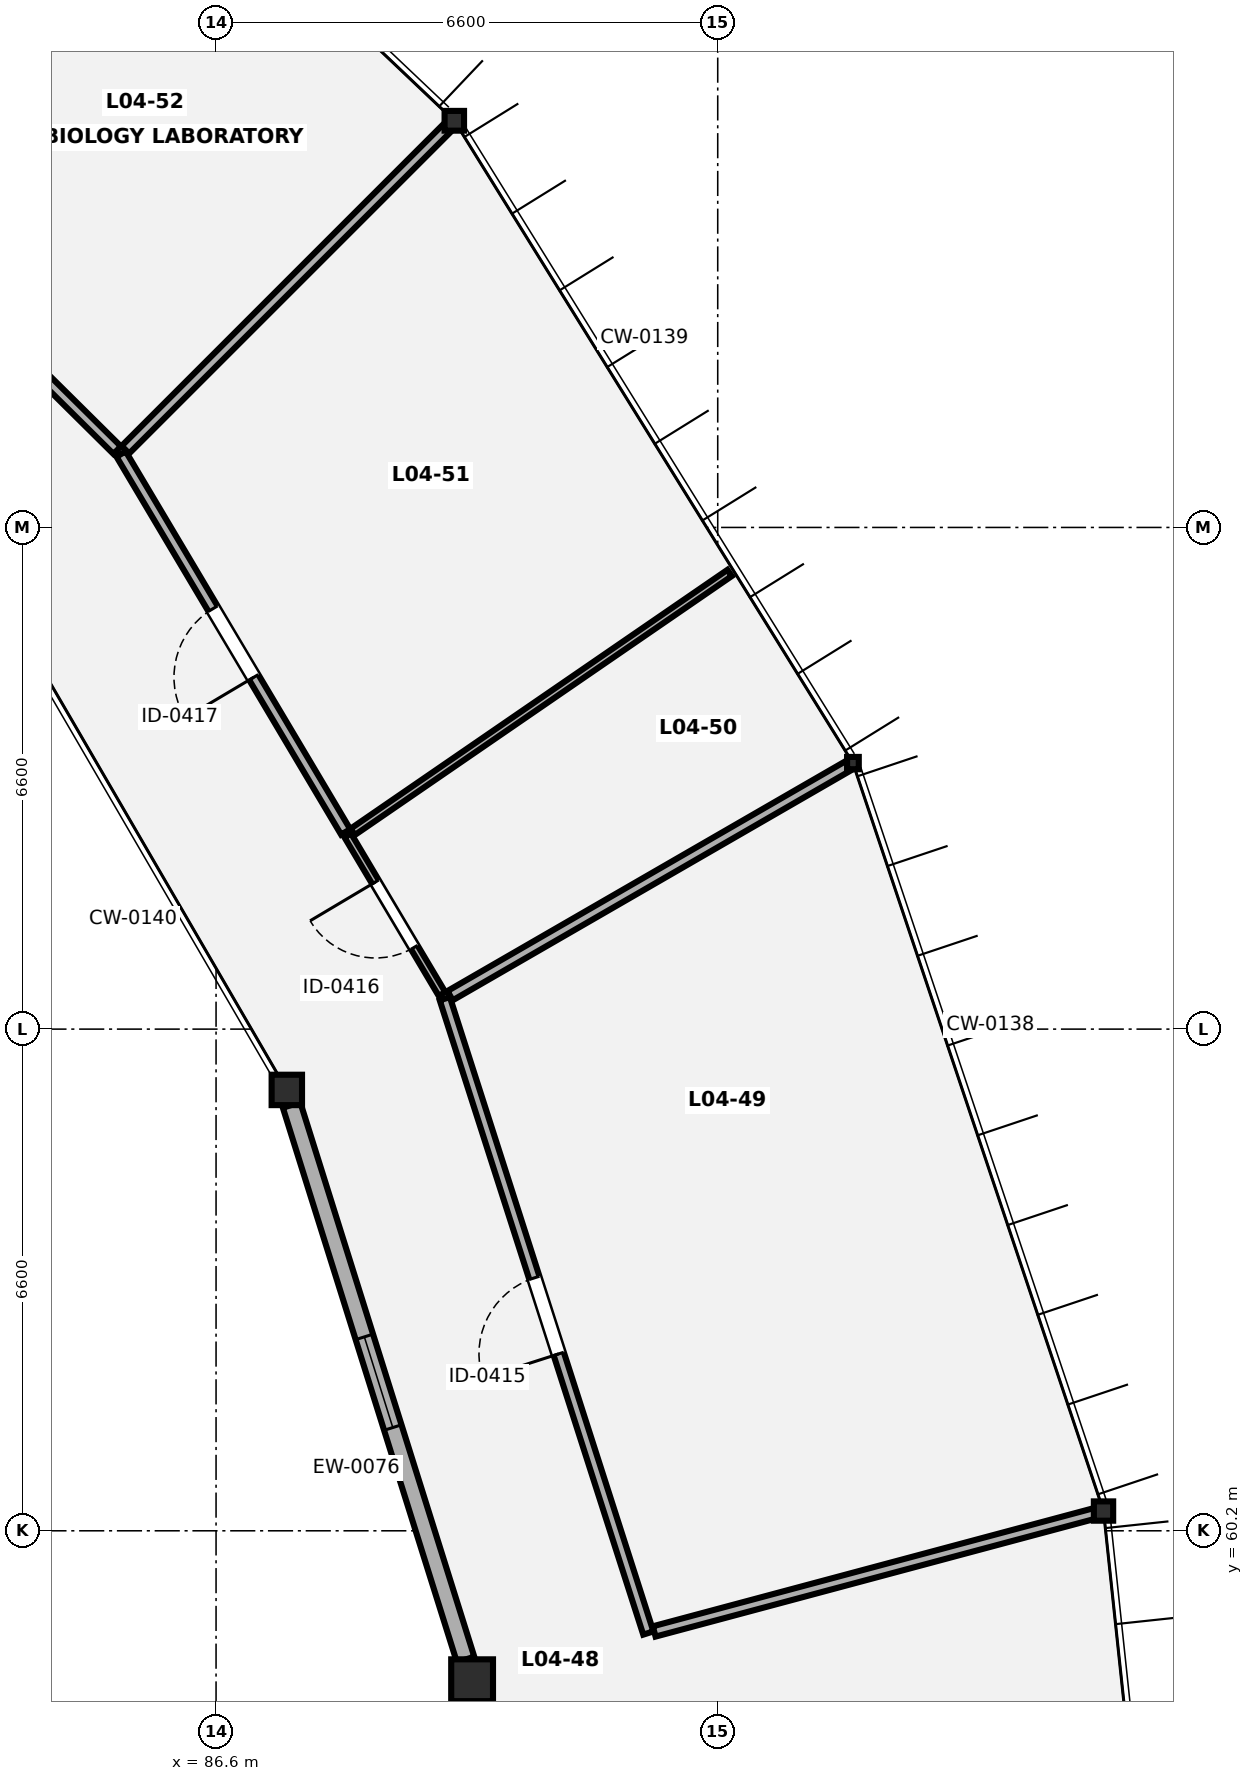
"""IFC4 building model, lengths in metres.
Left out: names, types, materials, properties, quantities, classifications, styles, units other than length and angle.
Written with IfcOpenShell. Run it as: python <this file> out.ifc"""

import sys

from ifc_helpers import new_model, si_unit, direction, frame, frame_2d, origin, origin_2d, place, context, subcontext, project, spatial, rectangle, i_section, extrude, element, fill, save


model = new_model("IFC4")
c1 = context("Model", 3, precision=1e-05, world=origin(), true_north=direction((0.0, 1.0)))
c2 = subcontext(c1, "Body", "Model", "MODEL_VIEW")
j1 = project(units=[si_unit("LENGTHUNIT", "METRE"), si_unit("PLANEANGLEUNIT", "RADIAN")], contexts=[c1])
p1 = place(None, origin())
s1 = spatial("IfcSite", under=j1, at=p1, CompositionType="ELEMENT")
p2 = place(p1, origin())
s2 = spatial("IfcBuilding", under=s1, at=p2, CompositionType="ELEMENT")
p3 = place(p2, frame((0.0, 0.0, 17.5)))
s3 = spatial("IfcBuildingStorey", under=s2, at=p3, CompositionType="ELEMENT", Elevation=17.5)
p4 = place(p3, frame((98.276, 60.46, 0.0), z_axis=(0.0, 0.0, 1.0), x_axis=(1.0, 0.0, 0.0)))
e1 = element("IfcColumn", 1, at=p4, inside=s3, PredefinedType="COLUMN", context=c2, shape_type="SweptSolid", body=[
    extrude(i_section(OverallWidth=0.254, OverallDepth=0.254, WebThickness=0.009, FlangeThickness=0.014, FilletRadius=0.014, at=origin_2d()), origin(), (0.0, 0.0, 1.0), 4.2),
])
p5 = place(p3, frame((89.969, 58.234, 0.0), z_axis=(0.0, 0.0, 1.0), x_axis=(1.0, 0.0, 0.0)))
e2 = element("IfcColumn", 2, at=p5, inside=s3, PredefinedType="COLUMN", context=c2, shape_type="SweptSolid", body=[
    extrude(rectangle(XDim=0.55, YDim=0.55, at=origin_2d()), origin(), (0.0, 0.0, 1.0), 4.2),
])
p6 = place(p3, frame((94.979, 70.3, 0.0), z_axis=(0.0, 0.0, 1.0), x_axis=(1.0, 0.0, 0.0)))
e3 = element("IfcColumn", 3, at=p6, inside=s3, PredefinedType="COLUMN", context=c2, shape_type="SweptSolid", body=[
    extrude(i_section(OverallWidth=0.154, OverallDepth=0.162, WebThickness=0.008, FlangeThickness=0.011, FilletRadius=0.009, at=origin_2d()), origin(), (0.0, 0.0, 1.0), 4.2),
])
p7 = place(p3, frame((87.531, 66.0, 0.0), z_axis=(0.0, 0.0, 1.0), x_axis=(1.0, 0.0, 0.0)))
e4 = element("IfcColumn", 4, at=p7, inside=s3, PredefinedType="PILASTER", context=c2, shape_type="SweptSolid", body=[
    extrude(rectangle(XDim=0.4, YDim=0.4, at=origin_2d()), origin(), (0.0, 0.0, 1.0), 4.2),
])
p8 = place(p3, frame((89.735, 78.75, 0.0), z_axis=(0.0, 0.0, 1.0), x_axis=(1.0, 0.0, 0.0)))
e5 = element("IfcColumn", 5, at=p8, inside=s3, PredefinedType="COLUMN", context=c2, shape_type="SweptSolid", body=[
    extrude(i_section(OverallWidth=0.256, OverallDepth=0.26, WebThickness=0.01, FlangeThickness=0.017, FilletRadius=0.014, at=origin_2d()), origin(), (0.0, 0.0, 1.0), 4.2),
])
p9 = place(p3, frame((89.883, 58.507, 0.0), z_axis=(0.0, 0.0, 1.0), x_axis=(-0.299452933333, 0.954111073575, 0.0)))
e6 = element("IfcWall", 6, at=p9, inside=s3, PredefinedType="SOLIDWALL", context=c2, shape_type="SweptSolid", body=[
    extrude(rectangle(XDim=7.646, YDim=0.24, at=frame_2d((3.823, 0.0))), origin(), (0.0, 0.0, 1.0), 3.65),
])
p10 = place(p9, frame((3.198, 0.0, 0.85)))
e7 = element("IfcOpeningElement", 7, at=p10, cuts=e6, PredefinedType="OPENING", context=c2, shape_type="SweptSolid", body=[
    extrude(rectangle(XDim=1.25, YDim=1.4, at=frame_2d((0.625, 0.7))), frame((0.0, 0.13, 0.0), z_axis=(0.0, -1.0, 0.0), x_axis=(1.0, 0.0, 0.0)), (0.0, 0.0, 1.0), 0.26),
])
p11 = place(p3, frame((92.287, 58.855, 0.0), z_axis=(0.0, 0.0, 1.0), x_axis=(-0.30548522006, 0.952196818061, 0.0)))
e8 = element("IfcWall", 8, at=p11, inside=s3, PredefinedType="PARTITIONING", context=c2, shape_type="SweptSolid", body=[
    extrude(rectangle(XDim=8.764, YDim=0.14, at=frame_2d((4.382, 0.0))), origin(), (0.0, 0.0, 1.0), 4.0),
])
p12 = place(p11, frame((3.857, 0.0, 0.0)))
e9 = element("IfcOpeningElement", 9, at=p12, cuts=e8, PredefinedType="OPENING", context=c2, shape_type="SweptSolid", body=[
    extrude(rectangle(XDim=1.05, YDim=2.15, at=frame_2d((0.525, 1.075))), frame((0.0, 0.08, 0.0), z_axis=(0.0, -1.0, 0.0), x_axis=(1.0, 0.0, 0.0)), (0.0, 0.0, 1.0), 0.16),
])
p13 = place(p3, frame((92.364, 58.876, 0.0), z_axis=(0.0, 0.0, 1.0), x_axis=(0.96591927772, 0.258843483457, 0.0)))
e10 = element("IfcWall", 10, at=p13, inside=s3, PredefinedType="PARTITIONING", context=c2, shape_type="SweptSolid", body=[
    extrude(rectangle(XDim=6.06, YDim=0.14, at=frame_2d((3.03, 0.0))), origin(), (0.0, 0.0, 1.0), 3.323),
])
p14 = place(p3, frame((89.679, 67.24, 0.0), z_axis=(0.0, 0.0, 1.0), x_axis=(0.866020543329, 0.500008418462, 0.0)))
e11 = element("IfcWall", 11, at=p14, inside=s3, PredefinedType="PARTITIONING", context=c2, shape_type="SweptSolid", body=[
    extrude(rectangle(XDim=6.06, YDim=0.14, at=frame_2d((3.03, 0.0))), origin(), (0.0, 0.0, 1.0), 3.471),
])
p15 = place(p3, frame((89.573, 67.262, 0.0), z_axis=(0.0, 0.0, 1.0), x_axis=(-0.510928867953, 0.859622994046, 0.0)))
e12 = element("IfcWall", 12, at=p15, inside=s3, PredefinedType="PARTITIONING", context=c2, shape_type="SweptSolid", body=[
    extrude(rectangle(XDim=2.429, YDim=0.1, at=frame_2d((1.214, 0.0))), origin(), (0.0, 0.0, 1.0), 4.0),
])
p16 = place(p15, frame((0.714, 0.0, 0.0)))
e13 = element("IfcOpeningElement", 13, at=p16, cuts=e12, PredefinedType="OPENING", context=c2, shape_type="SweptSolid", body=[
    extrude(rectangle(XDim=1.0, YDim=2.1, at=frame_2d((0.5, 1.05))), frame((0.0, 0.06, 0.0), z_axis=(0.0, -1.0, 0.0), x_axis=(1.0, 0.0, 0.0)), (0.0, 0.0, 1.0), 0.12),
])
p17 = place(p3, frame((88.398, 69.395, 0.0), z_axis=(0.0, 0.0, 1.0), x_axis=(0.824271584206, 0.566194626847, 0.0)))
e14 = element("IfcWall", 14, at=p17, inside=s3, PredefinedType="PARTITIONING", context=c2, shape_type="SweptSolid", body=[
    extrude(rectangle(XDim=6.016, YDim=0.1, at=frame_2d((3.008, 0.0))), origin(), (0.0, 0.0, 1.0), 4.0),
])
p18 = place(p3, frame((88.305, 69.395, 0.0), z_axis=(0.0, 0.0, 1.0), x_axis=(-0.510896676259, 0.859642126811, 0.0)))
e15 = element("IfcWall", 15, at=p18, inside=s3, PredefinedType="PARTITIONING", context=c2, shape_type="SweptSolid", body=[
    extrude(rectangle(XDim=5.783, YDim=0.14, at=frame_2d((2.892, 0.0))), origin(), (0.0, 0.0, 1.0), 4.0),
])
p19 = place(p18, frame((2.366, 0.0, 0.0)))
e16 = element("IfcOpeningElement", 16, at=p19, cuts=e15, PredefinedType="OPENING", context=c2, shape_type="SweptSolid", body=[
    extrude(rectangle(XDim=1.05, YDim=2.15, at=frame_2d((0.525, 1.075))), frame((0.0, 0.08, 0.0), z_axis=(0.0, -1.0, 0.0), x_axis=(1.0, 0.0, 0.0)), (0.0, 0.0, 1.0), 0.16),
])
p20 = place(p3, frame((85.407, 74.423, 0.0), z_axis=(0.0, 0.0, 1.0), x_axis=(0.70712692467, 0.707086637129, 0.0)))
e17 = element("IfcWall", 17, at=p20, inside=s3, PredefinedType="PARTITIONING", context=c2, shape_type="SweptSolid", body=[
    extrude(rectangle(XDim=6.06, YDim=0.14, at=frame_2d((3.03, 0.0))), origin(), (0.0, 0.0, 1.0), 3.465),
])
p21 = place(p3, frame((85.299, 74.417, 0.0), z_axis=(0.0, 0.0, 1.0), x_axis=(-0.710410596589, 0.703787456732, 0.0)))
e18 = element("IfcWall", 18, at=p21, inside=s3, PredefinedType="PARTITIONING", context=c2, shape_type="SweptSolid", body=[
    extrude(rectangle(XDim=7.741, YDim=0.14, at=frame_2d((3.871, 0.0))), origin(), (0.0, 0.0, 1.0), 4.0),
])
p22 = place(p21, frame((3.345, 0.0, 0.0)))
e19 = element("IfcOpeningElement", 19, at=p22, cuts=e18, PredefinedType="OPENING", context=c2, shape_type="SweptSolid", body=[
    extrude(rectangle(XDim=1.05, YDim=2.15, at=frame_2d((0.525, 1.075))), frame((0.0, 0.08, 0.0), z_axis=(0.0, -1.0, 0.0), x_axis=(1.0, 0.0, 0.0)), (0.0, 0.0, 1.0), 0.16),
])
p23 = place(p10, origin())
e20 = element("IfcWindow", 20, at=p23, inside=s3, PartitioningType="SINGLE_PANEL", PredefinedType="WINDOW", context=c2, shape_type="SweptSolid", body=[
    extrude(rectangle(XDim=1.25, YDim=1.4, at=frame_2d((0.625, 0.7))), frame((0.0, 0.03, 0.0), z_axis=(0.0, -1.0, 0.0), x_axis=(1.0, 0.0, 0.0)), (0.0, 0.0, 1.0), 0.06),
])
fill(e7, e20)
p24 = place(p12, origin())
e21 = element("IfcDoor", 21, at=p24, inside=s3, OperationType="SINGLE_SWING_LEFT", PredefinedType="DOOR", context=c2, shape_type="SweptSolid", body=[
    extrude(rectangle(XDim=1.05, YDim=2.15, at=frame_2d((0.525, 1.075))), frame((0.0, 0.025, 0.0), z_axis=(0.0, -1.0, 0.0), x_axis=(1.0, 0.0, 0.0)), (0.0, 0.0, 1.0), 0.05),
])
fill(e9, e21)
p25 = place(p16, origin())
e22 = element("IfcDoor", 22, at=p25, inside=s3, OperationType="SINGLE_SWING_RIGHT", PredefinedType="DOOR", context=c2, shape_type="SweptSolid", body=[
    extrude(rectangle(XDim=1.0, YDim=2.1, at=frame_2d((0.5, 1.05))), frame((0.0, 0.025, 0.0), z_axis=(0.0, -1.0, 0.0), x_axis=(1.0, 0.0, 0.0)), (0.0, 0.0, 1.0), 0.05),
])
fill(e13, e22)
p26 = place(p19, origin())
e23 = element("IfcDoor", 23, at=p26, inside=s3, OperationType="SINGLE_SWING_LEFT", PredefinedType="DOOR", context=c2, shape_type="SweptSolid", body=[
    extrude(rectangle(XDim=1.05, YDim=2.15, at=frame_2d((0.525, 1.075))), frame((0.0, 0.025, 0.0), z_axis=(0.0, -1.0, 0.0), x_axis=(1.0, 0.0, 0.0)), (0.0, 0.0, 1.0), 0.05),
])
fill(e16, e23)
save(model, sys.argv[1])
